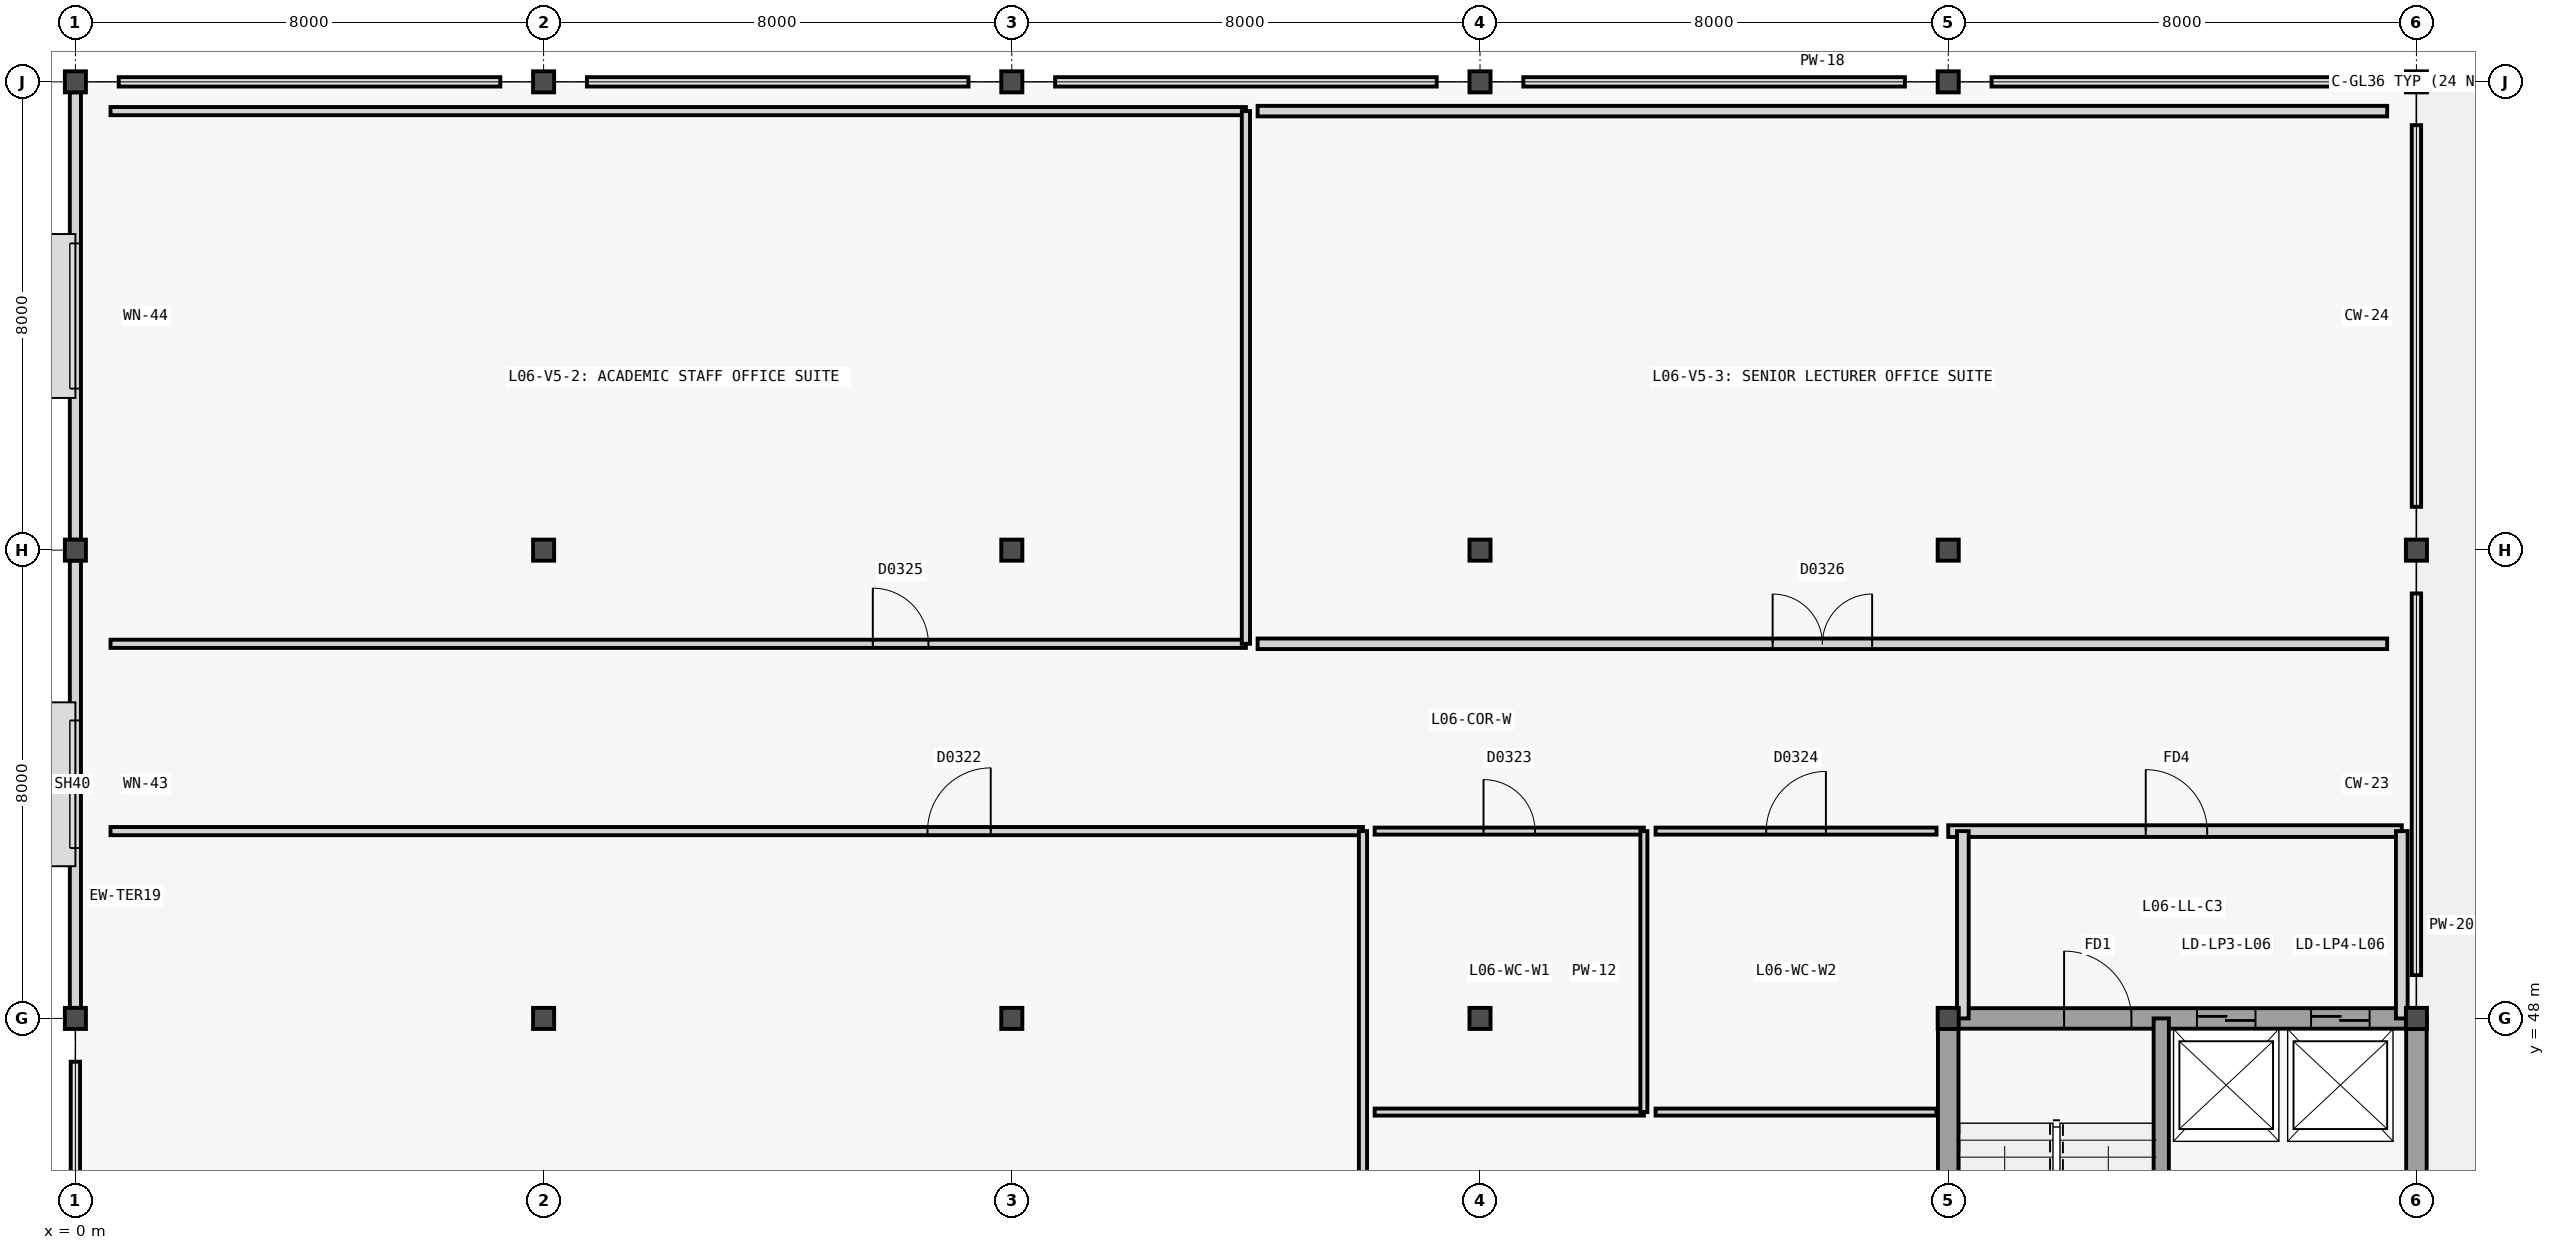
"""IFC4 building model, lengths in metres.
Left out: names, types, materials, properties, quantities, classifications, styles, units other than length and angle.
Written with IfcOpenShell. Run it as: python <this file> out.ifc"""

import sys

from ifc_helpers import new_model, si_unit, direction, frame, frame_2d, origin, origin_2d, place, context, subcontext, project, spatial, rectangle, extrude, element, fill, save


model = new_model("IFC4")
c1 = context("Model", 3, precision=1e-05, world=origin(), true_north=direction((0.0, 1.0)))
c2 = subcontext(c1, "Body", "Model", "MODEL_VIEW")
j1 = project(units=[si_unit("LENGTHUNIT", "METRE"), si_unit("PLANEANGLEUNIT", "RADIAN")], contexts=[c1])
p1 = place(None, origin())
s1 = spatial("IfcSite", under=j1, at=p1, CompositionType="ELEMENT")
p2 = place(p1, origin())
s2 = spatial("IfcBuilding", under=s1, at=p2, CompositionType="ELEMENT")
p3 = place(p2, frame((0.0, 0.0, 25.2)))
s3 = spatial("IfcBuildingStorey", under=s2, at=p3, CompositionType="ELEMENT", Elevation=25.2)
for number, where, z_axis, x_axis in (
    (1, (0.0, 48.0, 0.0), (0.0, 0.0, 1.0), (1.0, 0.0, 0.0)),
    (2, (0.0, 56.0, 0.0), (0.0, 0.0, 1.0), (1.0, 0.0, 0.0)),
    (3, (0.0, 64.0, 0.0), (0.0, 0.0, 1.0), (1.0, 0.0, 0.0)),
    (4, (8.0, 48.0, 0.0), (0.0, 0.0, 1.0), (1.0, 0.0, 0.0)),
    (5, (8.0, 56.0, 0.0), (0.0, 0.0, 1.0), (1.0, 0.0, 0.0)),
    (6, (8.0, 64.0, 0.0), (0.0, 0.0, 1.0), (1.0, 0.0, 0.0)),
    (7, (16.0, 48.0, 0.0), (0.0, 0.0, 1.0), (1.0, 0.0, 0.0)),
    (8, (16.0, 56.0, 0.0), (0.0, 0.0, 1.0), (1.0, 0.0, 0.0)),
    (9, (16.0, 64.0, 0.0), (0.0, 0.0, 1.0), (1.0, 0.0, 0.0)),
    (10, (24.0, 48.0, 0.0), (0.0, 0.0, 1.0), (1.0, 0.0, 0.0)),
    (11, (24.0, 56.0, 0.0), (0.0, 0.0, 1.0), (1.0, 0.0, 0.0)),
    (12, (24.0, 64.0, 0.0), (0.0, 0.0, 1.0), (1.0, 0.0, 0.0)),
    (13, (32.0, 48.0, 0.0), (0.0, 0.0, 1.0), (1.0, 0.0, 0.0)),
    (14, (32.0, 56.0, 0.0), (0.0, 0.0, 1.0), (1.0, 0.0, 0.0)),
    (15, (32.0, 64.0, 0.0), (0.0, 0.0, 1.0), (1.0, 0.0, 0.0)),
    (16, (40.0, 48.0, 0.0), (0.0, 0.0, 1.0), (1.0, 0.0, 0.0)),
    (17, (40.0, 56.0, 0.0), (0.0, 0.0, 1.0), (1.0, 0.0, 0.0)),
    (18, (40.0, 64.0, 0.0), (0.0, 0.0, 1.0), (1.0, 0.0, 0.0)),
):
    element("IfcColumn", number, at=place(p3, frame(where, z_axis=z_axis, x_axis=x_axis)), inside=s3, PredefinedType="COLUMN", context=c2, shape_type="SweptSolid", body=[
        extrude(rectangle(XDim=0.36, YDim=0.36, at=origin_2d()), origin(), (0.0, 0.0, 1.0), 3.6),
    ])
p4 = place(p3, frame((0.0, 48.178, 0.0), z_axis=(0.0, 0.0, 1.0), x_axis=(0.0, 1.0, 0.0)))
e19 = element("IfcWall", 19, at=p4, inside=s3, PredefinedType="SOLIDWALL", context=c2, shape_type="SweptSolid", body=[
    extrude(rectangle(XDim=7.644, YDim=0.19, at=frame_2d((3.822, 0.0))), origin(), (0.0, 0.0, 1.0), 2.8),
])
p5 = place(p4, frame((2.732, 0.0, 0.88)))
e20 = element("IfcOpeningElement", 20, at=p5, cuts=e19, PredefinedType="OPENING", context=c2, shape_type="SweptSolid", body=[
    extrude(rectangle(XDim=2.18, YDim=1.72, at=frame_2d((1.09, 0.86))), frame((0.0, 0.105, 0.0), z_axis=(0.0, -1.0, 0.0), x_axis=(1.0, 0.0, 0.0)), (0.0, 0.0, 1.0), 0.21),
])
p6 = place(p3, frame((0.0, 56.178, 0.0), z_axis=(0.0, 0.0, 1.0), x_axis=(0.0, 1.0, 0.0)))
e21 = element("IfcWall", 21, at=p6, inside=s3, PredefinedType="SOLIDWALL", context=c2, shape_type="SweptSolid", body=[
    extrude(rectangle(XDim=7.644, YDim=0.19, at=frame_2d((3.822, 0.0))), origin(), (0.0, 0.0, 1.0), 2.8),
])
p7 = place(p6, frame((2.582, 0.0, 0.88)))
e22 = element("IfcOpeningElement", 22, at=p7, cuts=e21, PredefinedType="OPENING", context=c2, shape_type="SweptSolid", body=[
    extrude(rectangle(XDim=2.48, YDim=1.78, at=frame_2d((1.24, 0.89))), frame((0.0, 0.105, 0.0), z_axis=(0.0, -1.0, 0.0), x_axis=(1.0, 0.0, 0.0)), (0.0, 0.0, 1.0), 0.21),
])
for number, where, z_axis, x_axis in (
    (23, (32.0, 40.0, 0.0), (0.0, 0.0, 1.0), (0.0, 1.0, 0.0)),
    (24, (40.0, 40.0, 0.0), (0.0, 0.0, 1.0), (0.0, 1.0, 0.0)),
):
    element("IfcWall", number, at=place(p3, frame(where, z_axis=z_axis, x_axis=x_axis)), inside=s3, PredefinedType="SHEAR", context=c2, shape_type="SweptSolid", body=[
        extrude(rectangle(XDim=8.0, YDim=0.35, at=frame_2d((4.0, 0.0))), origin(), (0.0, 0.0, 1.0), 3.6),
    ])
p8 = place(p3, frame((32.0, 48.0, 0.0), z_axis=(0.0, 0.0, 1.0), x_axis=(1.0, 0.0, 0.0)))
e25 = element("IfcWall", 25, at=p8, inside=s3, PredefinedType="SHEAR", context=c2, shape_type="SweptSolid", body=[
    extrude(rectangle(XDim=8.0, YDim=0.35, at=frame_2d((4.0, 0.0))), origin(), (0.0, 0.0, 1.0), 3.6),
])
p9 = place(p8, frame((1.98, 0.0, 0.0)))
e26 = element("IfcOpeningElement", 26, at=p9, cuts=e25, PredefinedType="OPENING", context=c2, shape_type="SweptSolid", body=[
    extrude(rectangle(XDim=1.15, YDim=2.2, at=frame_2d((0.575, 1.1))), frame((0.0, 0.185, 0.0), z_axis=(0.0, -1.0, 0.0), x_axis=(1.0, 0.0, 0.0)), (0.0, 0.0, 1.0), 0.37),
])
p10 = place(p8, frame((4.25, 0.0, 0.0)))
e27 = element("IfcOpeningElement", 27, at=p10, cuts=e25, PredefinedType="OPENING", context=c2, shape_type="SweptSolid", body=[
    extrude(rectangle(XDim=1.0, YDim=2.15, at=frame_2d((0.5, 1.075))), frame((0.0, 0.185, 0.0), z_axis=(0.0, -1.0, 0.0), x_axis=(1.0, 0.0, 0.0)), (0.0, 0.0, 1.0), 0.37),
])
p11 = place(p8, frame((6.2, 0.0, 0.0)))
e28 = element("IfcOpeningElement", 28, at=p11, cuts=e25, PredefinedType="OPENING", context=c2, shape_type="SweptSolid", body=[
    extrude(rectangle(XDim=1.0, YDim=2.15, at=frame_2d((0.5, 1.075))), frame((0.0, 0.185, 0.0), z_axis=(0.0, -1.0, 0.0), x_axis=(1.0, 0.0, 0.0)), (0.0, 0.0, 1.0), 0.37),
])
p12 = place(p3, frame((35.64, 40.0, 0.0), z_axis=(0.0, 0.0, 1.0), x_axis=(0.0, 1.0, 0.0)))
e29 = element("IfcWall", 29, at=p12, inside=s3, PredefinedType="SHEAR", context=c2, shape_type="SweptSolid", body=[
    extrude(rectangle(XDim=8.0, YDim=0.26, at=frame_2d((4.0, 0.0))), origin(), (0.0, 0.0, 1.0), 3.6),
])
p13 = place(p3, frame((32.0, 51.2, 0.0), z_axis=(0.0, 0.0, 1.0), x_axis=(1.0, 0.0, 0.0)))
e30 = element("IfcWall", 30, at=p13, inside=s3, PredefinedType="PARTITIONING", context=c2, shape_type="SweptSolid", body=[
    extrude(rectangle(XDim=7.75, YDim=0.2, at=frame_2d((3.875, 0.0))), origin(), (0.0, 0.0, 1.0), 3.32),
])
p14 = place(p13, frame((3.375, 0.0, 0.0)))
e31 = element("IfcOpeningElement", 31, at=p14, cuts=e30, PredefinedType="OPENING", context=c2, shape_type="SweptSolid", body=[
    extrude(rectangle(XDim=1.05, YDim=2.15, at=frame_2d((0.525, 1.075))), frame((0.0, 0.11, 0.0), z_axis=(0.0, -1.0, 0.0), x_axis=(1.0, 0.0, 0.0)), (0.0, 0.0, 1.0), 0.22),
])
p15 = place(p3, frame((39.75, 48.0, 0.0), z_axis=(0.0, 0.0, 1.0), x_axis=(0.0, 1.0, 0.0)))
e32 = element("IfcWall", 32, at=p15, inside=s3, PredefinedType="PARTITIONING", context=c2, shape_type="SweptSolid", body=[
    extrude(rectangle(XDim=3.2, YDim=0.2, at=frame_2d((1.6, 0.0))), origin(), (0.0, 0.0, 1.0), 2.8),
])
p16 = place(p3, frame((32.25, 48.0, 0.0), z_axis=(0.0, 0.0, 1.0), x_axis=(0.0, 1.0, 0.0)))
e33 = element("IfcWall", 33, at=p16, inside=s3, PredefinedType="PARTITIONING", context=c2, shape_type="SweptSolid", body=[
    extrude(rectangle(XDim=3.2, YDim=0.2, at=frame_2d((1.6, 0.0))), origin(), (0.0, 0.0, 1.0), 2.84),
])
p17 = place(p3, frame((0.6, 51.2, 0.0), z_axis=(0.0, 0.0, 1.0), x_axis=(1.0, 0.0, 0.0)))
e34 = element("IfcWall", 34, at=p17, inside=s3, PredefinedType="PARTITIONING", context=c2, shape_type="SweptSolid", body=[
    extrude(rectangle(XDim=21.4, YDim=0.14, at=frame_2d((10.7, 0.0))), origin(), (0.0, 0.0, 1.0), 3.34),
])
p18 = place(p17, frame((13.96, 0.0, 0.0)))
e35 = element("IfcOpeningElement", 35, at=p18, cuts=e34, PredefinedType="OPENING", context=c2, shape_type="SweptSolid", body=[
    extrude(rectangle(XDim=1.08, YDim=2.2, at=frame_2d((0.54, 1.1))), frame((0.0, 0.08, 0.0), z_axis=(0.0, -1.0, 0.0), x_axis=(1.0, 0.0, 0.0)), (0.0, 0.0, 1.0), 0.16),
])
p19 = place(p3, frame((22.0, 33.8, 0.0), z_axis=(0.0, 0.0, 1.0), x_axis=(0.0, 1.0, 0.0)))
e36 = element("IfcWall", 36, at=p19, inside=s3, PredefinedType="PARTITIONING", context=c2, shape_type="SweptSolid", body=[
    extrude(rectangle(XDim=17.4, YDim=0.14, at=frame_2d((8.7, 0.0))), origin(), (0.0, 0.0, 1.0), 3.34),
])
p20 = place(p3, frame((22.2, 46.4, 0.0), z_axis=(0.0, 0.0, 1.0), x_axis=(1.0, 0.0, 0.0)))
e37 = element("IfcWall", 37, at=p20, inside=s3, PredefinedType="PARTITIONING", context=c2, shape_type="SweptSolid", body=[
    extrude(rectangle(XDim=4.6, YDim=0.12, at=frame_2d((2.3, 0.0))), origin(), (0.0, 0.0, 1.0), 3.34),
])
p21 = place(p3, frame((22.2, 51.2, 0.0), z_axis=(0.0, 0.0, 1.0), x_axis=(1.0, 0.0, 0.0)))
e38 = element("IfcWall", 38, at=p21, inside=s3, PredefinedType="PARTITIONING", context=c2, shape_type="SweptSolid", body=[
    extrude(rectangle(XDim=4.6, YDim=0.12, at=frame_2d((2.3, 0.0))), origin(), (0.0, 0.0, 1.0), 3.34),
])
p22 = place(p21, frame((1.86, 0.0, 0.0)))
e39 = element("IfcOpeningElement", 39, at=p22, cuts=e38, PredefinedType="OPENING", context=c2, shape_type="SweptSolid", body=[
    extrude(rectangle(XDim=0.88, YDim=2.1, at=frame_2d((0.44, 1.05))), frame((0.0, 0.07, 0.0), z_axis=(0.0, -1.0, 0.0), x_axis=(1.0, 0.0, 0.0)), (0.0, 0.0, 1.0), 0.14),
])
for number, where, z_axis, x_axis in (
    (40, (26.8, 46.4, 0.0), (0.0, 0.0, 1.0), (0.0, 1.0, 0.0)),
    (41, (27.0, 46.4, 0.0), (0.0, 0.0, 1.0), (1.0, 0.0, 0.0)),
):
    element("IfcWall", number, at=place(p3, frame(where, z_axis=z_axis, x_axis=x_axis)), inside=s3, PredefinedType="PARTITIONING", context=c2, shape_type="SweptSolid", body=[
        extrude(rectangle(XDim=4.8, YDim=0.12, at=frame_2d((2.4, 0.0))), origin(), (0.0, 0.0, 1.0), 3.34),
    ])
p23 = place(p3, frame((27.0, 51.2, 0.0), z_axis=(0.0, 0.0, 1.0), x_axis=(1.0, 0.0, 0.0)))
e42 = element("IfcWall", 42, at=p23, inside=s3, PredefinedType="PARTITIONING", context=c2, shape_type="SweptSolid", body=[
    extrude(rectangle(XDim=4.8, YDim=0.12, at=frame_2d((2.4, 0.0))), origin(), (0.0, 0.0, 1.0), 3.34),
])
p24 = place(p23, frame((1.89, 0.0, 0.0)))
e43 = element("IfcOpeningElement", 43, at=p24, cuts=e42, PredefinedType="OPENING", context=c2, shape_type="SweptSolid", body=[
    extrude(rectangle(XDim=1.02, YDim=2.1, at=frame_2d((0.51, 1.05))), frame((0.0, 0.07, 0.0), z_axis=(0.0, -1.0, 0.0), x_axis=(1.0, 0.0, 0.0)), (0.0, 0.0, 1.0), 0.14),
])
p25 = place(p3, frame((0.6, 54.4, 0.0), z_axis=(0.0, 0.0, 1.0), x_axis=(1.0, 0.0, 0.0)))
e44 = element("IfcWall", 44, at=p25, inside=s3, PredefinedType="PARTITIONING", context=c2, shape_type="SweptSolid", body=[
    extrude(rectangle(XDim=19.4, YDim=0.14, at=frame_2d((9.7, 0.0))), origin(), (0.0, 0.0, 1.0), 3.34),
])
p26 = place(p25, frame((13.025, 0.0, 0.0)))
e45 = element("IfcOpeningElement", 45, at=p26, cuts=e44, PredefinedType="OPENING", context=c2, shape_type="SweptSolid", body=[
    extrude(rectangle(XDim=0.95, YDim=2.1, at=frame_2d((0.475, 1.05))), frame((0.0, 0.08, 0.0), z_axis=(0.0, -1.0, 0.0), x_axis=(1.0, 0.0, 0.0)), (0.0, 0.0, 1.0), 0.16),
])
p27 = place(p3, frame((0.6, 63.5, 0.0), z_axis=(0.0, 0.0, 1.0), x_axis=(1.0, 0.0, 0.0)))
e46 = element("IfcWall", 46, at=p27, inside=s3, PredefinedType="PARTITIONING", context=c2, shape_type="SweptSolid", body=[
    extrude(rectangle(XDim=19.4, YDim=0.14, at=frame_2d((9.7, 0.0))), origin(), (0.0, 0.0, 1.0), 3.34),
])
p28 = place(p3, frame((20.0, 54.4, 0.0), z_axis=(0.0, 0.0, 1.0), x_axis=(0.0, 1.0, 0.0)))
e47 = element("IfcWall", 47, at=p28, inside=s3, PredefinedType="PARTITIONING", context=c2, shape_type="SweptSolid", body=[
    extrude(rectangle(XDim=9.1, YDim=0.14, at=frame_2d((4.55, 0.0))), origin(), (0.0, 0.0, 1.0), 3.0),
])
p29 = place(p3, frame((20.2, 54.4, 0.0), z_axis=(0.0, 0.0, 1.0), x_axis=(1.0, 0.0, 0.0)))
e48 = element("IfcWall", 48, at=p29, inside=s3, PredefinedType="PARTITIONING", context=c2, shape_type="SweptSolid", body=[
    extrude(rectangle(XDim=19.3, YDim=0.18, at=frame_2d((9.65, 0.0))), origin(), (0.0, 0.0, 1.0), 3.34),
])
p30 = place(p29, frame((8.8, 0.0, 0.0)))
e49 = element("IfcOpeningElement", 49, at=p30, cuts=e48, PredefinedType="OPENING", context=c2, shape_type="SweptSolid", body=[
    extrude(rectangle(XDim=1.7, YDim=2.25, at=frame_2d((0.85, 1.125))), frame((0.0, 0.1, 0.0), z_axis=(0.0, -1.0, 0.0), x_axis=(1.0, 0.0, 0.0)), (0.0, 0.0, 1.0), 0.2),
])
p31 = place(p3, frame((20.2, 63.5, 0.0), z_axis=(0.0, 0.0, 1.0), x_axis=(1.0, 0.0, 0.0)))
e50 = element("IfcWall", 50, at=p31, inside=s3, PredefinedType="PARTITIONING", context=c2, shape_type="SweptSolid", body=[
    extrude(rectangle(XDim=19.3, YDim=0.18, at=frame_2d((9.65, 0.0))), origin(), (0.0, 0.0, 1.0), 3.34),
])
p32 = place(p5, origin())
e51 = element("IfcWindow", 51, at=p32, inside=s3, PartitioningType="SINGLE_PANEL", PredefinedType="WINDOW", context=c2, shape_type="SweptSolid", body=[
    extrude(rectangle(XDim=2.18, YDim=1.72, at=frame_2d((1.09, 0.86))), frame((0.0, 0.03, 0.0), z_axis=(0.0, -1.0, 0.0), x_axis=(1.0, 0.0, 0.0)), (0.0, 0.0, 1.0), 0.06),
])
fill(e20, e51)
p33 = place(p7, origin())
e52 = element("IfcWindow", 52, at=p33, inside=s3, PartitioningType="SINGLE_PANEL", PredefinedType="WINDOW", context=c2, shape_type="SweptSolid", body=[
    extrude(rectangle(XDim=2.48, YDim=1.78, at=frame_2d((1.24, 0.89))), frame((0.0, 0.03, 0.0), z_axis=(0.0, -1.0, 0.0), x_axis=(1.0, 0.0, 0.0)), (0.0, 0.0, 1.0), 0.06),
])
fill(e22, e52)
p34 = place(p9, origin())
e53 = element("IfcDoor", 53, at=p34, inside=s3, OperationType="SINGLE_SWING_LEFT", PredefinedType="DOOR", context=c2, shape_type="SweptSolid", body=[
    extrude(rectangle(XDim=1.15, YDim=2.2, at=frame_2d((0.575, 1.1))), frame((0.0, 0.025, 0.0), z_axis=(0.0, -1.0, 0.0), x_axis=(1.0, 0.0, 0.0)), (0.0, 0.0, 1.0), 0.05),
])
fill(e26, e53)
p35 = place(p10, origin())
e54 = element("IfcDoor", 54, at=p35, inside=s3, OperationType="DOUBLE_DOOR_SLIDING", PredefinedType="DOOR", context=c2, shape_type="SweptSolid", body=[
    extrude(rectangle(XDim=1.0, YDim=2.15, at=frame_2d((0.5, 1.075))), frame((0.0, 0.025, 0.0), z_axis=(0.0, -1.0, 0.0), x_axis=(1.0, 0.0, 0.0)), (0.0, 0.0, 1.0), 0.05),
])
fill(e27, e54)
p36 = place(p11, origin())
e55 = element("IfcDoor", 55, at=p36, inside=s3, OperationType="DOUBLE_DOOR_SLIDING", PredefinedType="DOOR", context=c2, shape_type="SweptSolid", body=[
    extrude(rectangle(XDim=1.0, YDim=2.15, at=frame_2d((0.5, 1.075))), frame((0.0, 0.025, 0.0), z_axis=(0.0, -1.0, 0.0), x_axis=(1.0, 0.0, 0.0)), (0.0, 0.0, 1.0), 0.05),
])
fill(e28, e55)
p37 = place(p14, origin())
e56 = element("IfcDoor", 56, at=p37, inside=s3, OperationType="SINGLE_SWING_LEFT", PredefinedType="DOOR", context=c2, shape_type="SweptSolid", body=[
    extrude(rectangle(XDim=1.05, YDim=2.15, at=frame_2d((0.525, 1.075))), frame((0.0, 0.025, 0.0), z_axis=(0.0, -1.0, 0.0), x_axis=(1.0, 0.0, 0.0)), (0.0, 0.0, 1.0), 0.05),
])
fill(e31, e56)
p38 = place(p18, origin())
e57 = element("IfcDoor", 57, at=p38, inside=s3, OperationType="SINGLE_SWING_RIGHT", PredefinedType="DOOR", context=c2, shape_type="SweptSolid", body=[
    extrude(rectangle(XDim=1.08, YDim=2.2, at=frame_2d((0.54, 1.1))), frame((0.0, 0.025, 0.0), z_axis=(0.0, -1.0, 0.0), x_axis=(1.0, 0.0, 0.0)), (0.0, 0.0, 1.0), 0.05),
])
fill(e35, e57)
p39 = place(p22, origin())
e58 = element("IfcDoor", 58, at=p39, inside=s3, OperationType="SINGLE_SWING_LEFT", PredefinedType="DOOR", context=c2, shape_type="SweptSolid", body=[
    extrude(rectangle(XDim=0.88, YDim=2.1, at=frame_2d((0.44, 1.05))), frame((0.0, 0.025, 0.0), z_axis=(0.0, -1.0, 0.0), x_axis=(1.0, 0.0, 0.0)), (0.0, 0.0, 1.0), 0.05),
])
fill(e39, e58)
p40 = place(p24, origin())
e59 = element("IfcDoor", 59, at=p40, inside=s3, OperationType="SINGLE_SWING_RIGHT", PredefinedType="DOOR", context=c2, shape_type="SweptSolid", body=[
    extrude(rectangle(XDim=1.02, YDim=2.1, at=frame_2d((0.51, 1.05))), frame((0.0, 0.025, 0.0), z_axis=(0.0, -1.0, 0.0), x_axis=(1.0, 0.0, 0.0)), (0.0, 0.0, 1.0), 0.05),
])
fill(e43, e59)
p41 = place(p26, origin())
e60 = element("IfcDoor", 60, at=p41, inside=s3, OperationType="SINGLE_SWING_LEFT", PredefinedType="DOOR", context=c2, shape_type="SweptSolid", body=[
    extrude(rectangle(XDim=0.95, YDim=2.1, at=frame_2d((0.475, 1.05))), frame((0.0, 0.025, 0.0), z_axis=(0.0, -1.0, 0.0), x_axis=(1.0, 0.0, 0.0)), (0.0, 0.0, 1.0), 0.05),
])
fill(e45, e60)
p42 = place(p30, origin())
e61 = element("IfcDoor", 61, at=p42, inside=s3, OperationType="DOUBLE_DOOR_SINGLE_SWING", PredefinedType="DOOR", context=c2, shape_type="SweptSolid", body=[
    extrude(rectangle(XDim=1.7, YDim=2.25, at=frame_2d((0.85, 1.125))), frame((0.0, 0.025, 0.0), z_axis=(0.0, -1.0, 0.0), x_axis=(1.0, 0.0, 0.0)), (0.0, 0.0, 1.0), 0.05),
])
fill(e49, e61)
save(model, sys.argv[1])
